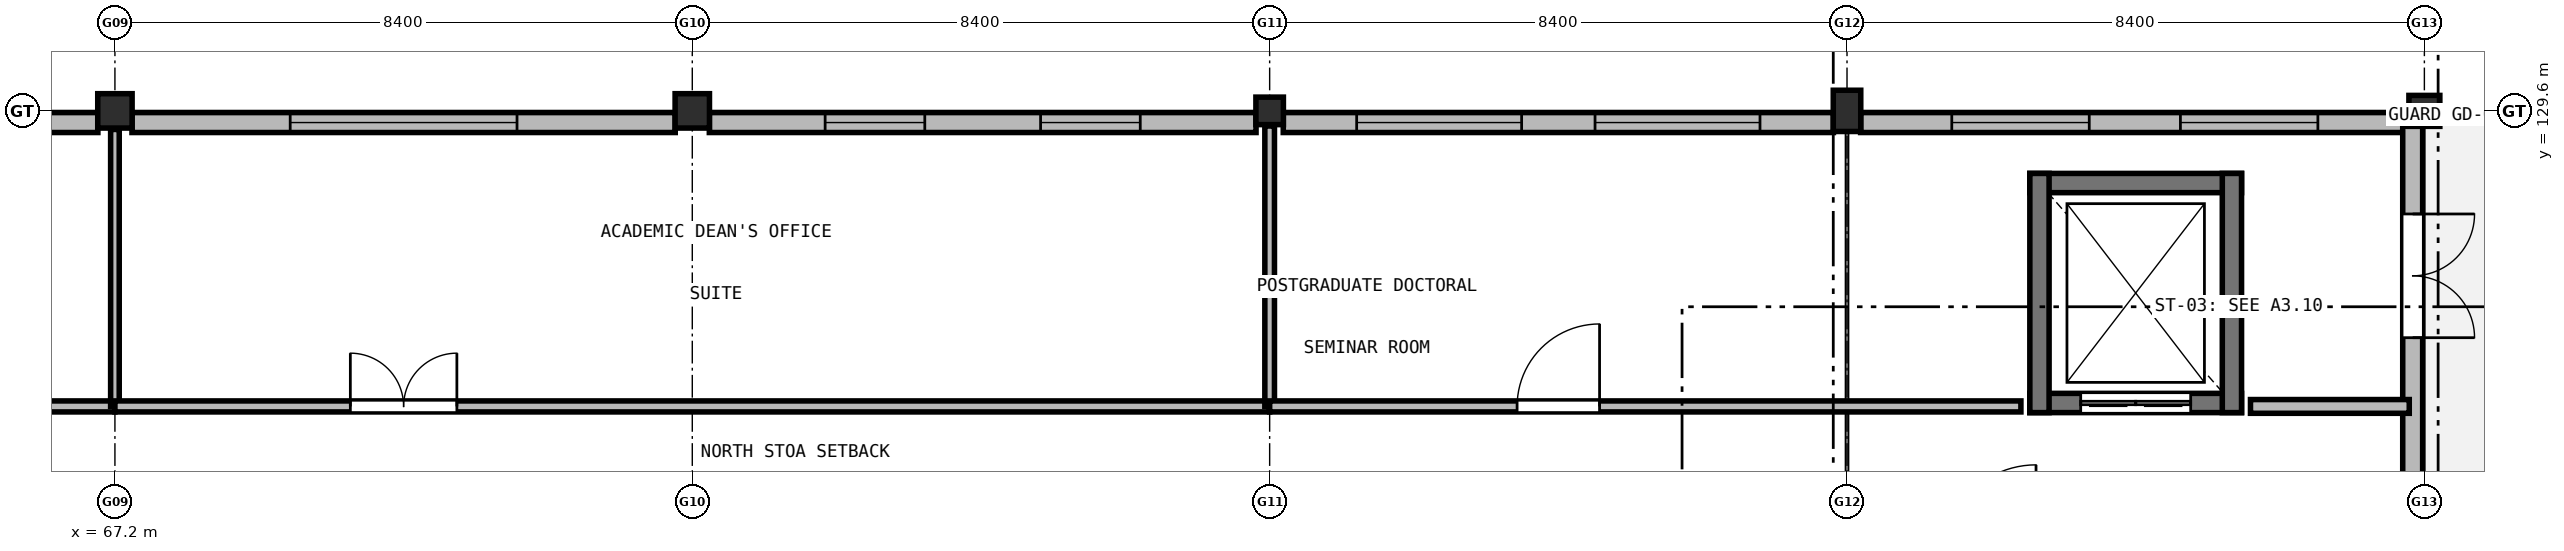
"""IFC4 building model, lengths in metres.
Left out: names, types, materials, properties, quantities, classifications, styles, units other than length and angle.
Written with IfcOpenShell. Run it as: python <this file> out.ifc"""

import sys

from ifc_helpers import new_model, si_unit, direction, frame, frame_2d, origin, origin_2d, place, context, subcontext, project, spatial, rectangle, extrude, element, fill, save


model = new_model("IFC4")
c1 = context("Model", 3, precision=1e-05, world=origin(), true_north=direction((0.0, 1.0)))
c2 = subcontext(c1, "Body", "Model", "MODEL_VIEW")
j1 = project(units=[si_unit("LENGTHUNIT", "METRE"), si_unit("PLANEANGLEUNIT", "RADIAN")], contexts=[c1])
p1 = place(None, origin())
s1 = spatial("IfcSite", under=j1, at=p1, CompositionType="ELEMENT")
p2 = place(p1, origin())
s2 = spatial("IfcBuilding", under=s1, at=p2, CompositionType="ELEMENT")
p3 = place(p2, frame((0.0, 0.0, 21.9)))
s3 = spatial("IfcBuildingStorey", under=s2, at=p3, CompositionType="ELEMENT", Elevation=21.9)
for number, where, z_axis, x_axis in (
    (1, (67.2, 129.6, 0.0), (0.0, 0.0, 1.0), (1.0, 0.0, 0.0)),
    (2, (75.6, 129.6, 0.0), (0.0, 0.0, 1.0), (1.0, 0.0, 0.0)),
):
    element("IfcColumn", number, at=place(p3, frame(where, z_axis=z_axis, x_axis=x_axis)), inside=s3, PredefinedType="COLUMN", context=c2, shape_type="SweptSolid", body=[
        extrude(rectangle(XDim=0.5, YDim=0.5, at=origin_2d()), origin(), (0.0, 0.0, 1.0), 4.2),
    ])
p4 = place(p3, frame((84.0, 129.6, 0.0), z_axis=(0.0, 0.0, 1.0), x_axis=(1.0, 0.0, 0.0)))
e3 = element("IfcColumn", 3, at=p4, inside=s3, PredefinedType="COLUMN", context=c2, shape_type="SweptSolid", body=[
    extrude(rectangle(XDim=0.4, YDim=0.4, at=origin_2d()), origin(), (0.0, 0.0, 1.0), 4.2),
])
p5 = place(p3, frame((92.4, 129.6, 0.0), z_axis=(0.0, 0.0, 1.0), x_axis=(1.0, 0.0, 0.0)))
e4 = element("IfcColumn", 4, at=p5, inside=s3, PredefinedType="COLUMN", context=c2, shape_type="SweptSolid", body=[
    extrude(rectangle(XDim=0.4, YDim=0.6, at=origin_2d()), origin(), (0.0, 0.0, 1.0), 4.2),
])
p6 = place(p3, frame((100.8, 129.6, 0.0), z_axis=(0.0, 0.0, 1.0), x_axis=(1.0, 0.0, 0.0)))
e5 = element("IfcColumn", 5, at=p6, inside=s3, PredefinedType="COLUMN", context=c2, shape_type="SweptSolid", body=[
    extrude(rectangle(XDim=0.45, YDim=0.45, at=origin_2d()), origin(), (0.0, 0.0, 1.0), 4.2),
])
p7 = place(p3, frame((59.048, 129.43, 0.0), z_axis=(0.0, 0.0, 1.0), x_axis=(1.0, 0.0, 0.0)))
e6 = element("IfcWall", 6, at=p7, inside=s3, PredefinedType="SOLIDWALL", context=c2, shape_type="SweptSolid", body=[
    extrude(rectangle(XDim=7.904, YDim=0.29, at=frame_2d((3.952, 0.0))), origin(), (0.0, 0.0, 1.0), 3.25),
])
p8 = place(p7, frame((2.402, 0.0, 0.95)))
e7 = element("IfcOpeningElement", 7, at=p8, cuts=e6, PredefinedType="OPENING", context=c2, shape_type="SweptSolid", body=[
    extrude(rectangle(XDim=3.1, YDim=1.95, at=frame_2d((1.55, 0.975))), frame((0.0, 0.155, 0.0), z_axis=(0.0, -1.0, 0.0), x_axis=(1.0, 0.0, 0.0)), (0.0, 0.0, 1.0), 0.31),
])
p9 = place(p3, frame((67.448, 129.43, 0.0), z_axis=(0.0, 0.0, 1.0), x_axis=(1.0, 0.0, 0.0)))
e8 = element("IfcWall", 8, at=p9, inside=s3, PredefinedType="SOLIDWALL", context=c2, shape_type="SweptSolid", body=[
    extrude(rectangle(XDim=7.904, YDim=0.29, at=frame_2d((3.952, 0.0))), origin(), (0.0, 0.0, 1.0), 3.25),
])
p10 = place(p9, frame((2.302, 0.0, 0.95)))
e9 = element("IfcOpeningElement", 9, at=p10, cuts=e8, PredefinedType="OPENING", context=c2, shape_type="SweptSolid", body=[
    extrude(rectangle(XDim=3.3, YDim=1.65, at=frame_2d((1.65, 0.825))), frame((0.0, 0.155, 0.0), z_axis=(0.0, -1.0, 0.0), x_axis=(1.0, 0.0, 0.0)), (0.0, 0.0, 1.0), 0.31),
])
p11 = place(p3, frame((75.848, 129.43, 0.0), z_axis=(0.0, 0.0, 1.0), x_axis=(1.0, 0.0, 0.0)))
e10 = element("IfcWall", 10, at=p11, inside=s3, PredefinedType="SOLIDWALL", context=c2, shape_type="SweptSolid", body=[
    extrude(rectangle(XDim=7.954, YDim=0.29, at=frame_2d((3.977, 0.0))), origin(), (0.0, 0.0, 1.0), 3.25),
])
p12 = place(p11, frame((1.685, 0.0, 0.95)))
e11 = element("IfcOpeningElement", 11, at=p12, cuts=e10, PredefinedType="OPENING", context=c2, shape_type="SweptSolid", body=[
    extrude(rectangle(XDim=1.45, YDim=1.85, at=frame_2d((0.725, 0.925))), frame((0.0, 0.155, 0.0), z_axis=(0.0, -1.0, 0.0), x_axis=(1.0, 0.0, 0.0)), (0.0, 0.0, 1.0), 0.31),
])
p13 = place(p11, frame((4.819, 0.0, 0.95)))
e12 = element("IfcOpeningElement", 12, at=p13, cuts=e10, PredefinedType="OPENING", context=c2, shape_type="SweptSolid", body=[
    extrude(rectangle(XDim=1.45, YDim=1.85, at=frame_2d((0.725, 0.925))), frame((0.0, 0.155, 0.0), z_axis=(0.0, -1.0, 0.0), x_axis=(1.0, 0.0, 0.0)), (0.0, 0.0, 1.0), 0.31),
])
p14 = place(p3, frame((84.198, 129.43, 0.0), z_axis=(0.0, 0.0, 1.0), x_axis=(1.0, 0.0, 0.0)))
e13 = element("IfcWall", 13, at=p14, inside=s3, PredefinedType="SOLIDWALL", context=c2, shape_type="SweptSolid", body=[
    extrude(rectangle(XDim=8.004, YDim=0.29, at=frame_2d((4.002, 0.0))), origin(), (0.0, 0.0, 1.0), 3.25),
])
p15 = place(p14, frame((1.068, 0.0, 0.95)))
e14 = element("IfcOpeningElement", 14, at=p15, cuts=e13, PredefinedType="OPENING", context=c2, shape_type="SweptSolid", body=[
    extrude(rectangle(XDim=2.4, YDim=2.05, at=frame_2d((1.2, 1.025))), frame((0.0, 0.155, 0.0), z_axis=(0.0, -1.0, 0.0), x_axis=(1.0, 0.0, 0.0)), (0.0, 0.0, 1.0), 0.31),
])
p16 = place(p14, frame((4.536, 0.0, 0.95)))
e15 = element("IfcOpeningElement", 15, at=p16, cuts=e13, PredefinedType="OPENING", context=c2, shape_type="SweptSolid", body=[
    extrude(rectangle(XDim=2.4, YDim=2.05, at=frame_2d((1.2, 1.025))), frame((0.0, 0.155, 0.0), z_axis=(0.0, -1.0, 0.0), x_axis=(1.0, 0.0, 0.0)), (0.0, 0.0, 1.0), 0.31),
])
p17 = place(p3, frame((92.598, 129.43, 0.0), z_axis=(0.0, 0.0, 1.0), x_axis=(1.0, 0.0, 0.0)))
e16 = element("IfcWall", 16, at=p17, inside=s3, PredefinedType="SOLIDWALL", context=c2, shape_type="SweptSolid", body=[
    extrude(rectangle(XDim=7.979, YDim=0.29, at=frame_2d((3.99, 0.0))), origin(), (0.0, 0.0, 1.0), 3.25),
])
p18 = place(p17, frame((1.326, 0.0, 0.95)))
e17 = element("IfcOpeningElement", 17, at=p18, cuts=e16, PredefinedType="OPENING", context=c2, shape_type="SweptSolid", body=[
    extrude(rectangle(XDim=2.0, YDim=2.0, at=frame_2d((1.0, 1.0))), frame((0.0, 0.155, 0.0), z_axis=(0.0, -1.0, 0.0), x_axis=(1.0, 0.0, 0.0)), (0.0, 0.0, 1.0), 0.31),
])
p19 = place(p17, frame((4.653, 0.0, 0.95)))
e18 = element("IfcOpeningElement", 18, at=p19, cuts=e16, PredefinedType="OPENING", context=c2, shape_type="SweptSolid", body=[
    extrude(rectangle(XDim=2.0, YDim=2.0, at=frame_2d((1.0, 1.0))), frame((0.0, 0.155, 0.0), z_axis=(0.0, -1.0, 0.0), x_axis=(1.0, 0.0, 0.0)), (0.0, 0.0, 1.0), 0.31),
])
p20 = place(p3, frame((100.63, 129.377, 0.0), z_axis=(0.0, 0.0, 1.0), x_axis=(0.0, -1.0, 0.0)))
e19 = element("IfcWall", 19, at=p20, inside=s3, PredefinedType="SOLIDWALL", context=c2, shape_type="SweptSolid", body=[
    extrude(rectangle(XDim=11.177, YDim=0.29, at=frame_2d((5.588, 0.0))), origin(), (0.0, 0.0, 1.0), 3.86),
])
p21 = place(p20, frame((1.277, 0.0, 0.0)))
e20 = element("IfcOpeningElement", 20, at=p21, cuts=e19, PredefinedType="OPENING", context=c2, shape_type="SweptSolid", body=[
    extrude(rectangle(XDim=1.8, YDim=2.2, at=frame_2d((0.9, 1.1))), frame((0.0, 0.155, 0.0), z_axis=(0.0, -1.0, 0.0), x_axis=(1.0, 0.0, 0.0)), (0.0, 0.0, 1.0), 0.31),
])
p22 = place(p3, frame((98.14, 125.35, 0.0), z_axis=(0.0, 0.0, 1.0), x_axis=(-1.0, 0.0, 0.0)))
e21 = element("IfcWall", 21, at=p22, inside=s3, PredefinedType="SHEAR", context=c2, shape_type="SweptSolid", body=[
    extrude(rectangle(XDim=3.08, YDim=0.28, at=frame_2d((1.54, 0.0))), origin(), (0.0, 0.0, 1.0), 3.88),
])
p23 = place(p22, frame((0.74, 0.0, 0.0)))
e22 = element("IfcOpeningElement", 22, at=p23, cuts=e21, PredefinedType="OPENING", context=c2, shape_type="SweptSolid", body=[
    extrude(rectangle(XDim=1.6, YDim=2.2, at=frame_2d((0.8, 1.1))), frame((0.0, 0.15, 0.0), z_axis=(0.0, -1.0, 0.0), x_axis=(1.0, 0.0, 0.0)), (0.0, 0.0, 1.0), 0.3),
])
p24 = place(p3, frame((95.06, 128.55, 0.0), z_axis=(0.0, 0.0, 1.0), x_axis=(1.0, 0.0, 0.0)))
e23 = element("IfcWall", 23, at=p24, inside=s3, PredefinedType="SHEAR", context=c2, shape_type="SweptSolid", body=[
    extrude(rectangle(XDim=3.08, YDim=0.28, at=frame_2d((1.54, 0.0))), origin(), (0.0, 0.0, 1.0), 3.88),
])
for number, where, z_axis, x_axis in (
    (24, (95.2, 125.21, 0.0), (0.0, 0.0, 1.0), (0.0, 1.0, 0.0)),
    (25, (98.0, 128.69, 0.0), (0.0, 0.0, 1.0), (0.0, -1.0, 0.0)),
):
    element("IfcWall", number, at=place(p3, frame(where, z_axis=z_axis, x_axis=x_axis)), inside=s3, PredefinedType="SHEAR", context=c2, shape_type="SweptSolid", body=[
        extrude(rectangle(XDim=3.48, YDim=0.28, at=frame_2d((1.74, 0.0))), origin(), (0.0, 0.0, 1.0), 3.88),
    ])
p25 = place(p3, frame((56.07, 125.3, 0.0), z_axis=(0.0, 0.0, 1.0), x_axis=(1.0, 0.0, 0.0)))
e26 = element("IfcWall", 26, at=p25, inside=s3, PredefinedType="PARTITIONING", context=c2, shape_type="SweptSolid", body=[
    extrude(rectangle(XDim=11.13, YDim=0.16, at=frame_2d((5.565, 0.0))), origin(), (0.0, 0.0, 1.0), 3.455),
])
p26 = place(p3, frame((67.2, 125.3, 0.0), z_axis=(0.0, 0.0, 1.0), x_axis=(0.0, 1.0, 0.0)))
e27 = element("IfcWall", 27, at=p26, inside=s3, PredefinedType="PARTITIONING", context=c2, shape_type="SweptSolid", body=[
    extrude(rectangle(XDim=4.03, YDim=0.125, at=frame_2d((2.015, 0.0))), origin(), (0.0, 0.0, 1.0), 3.245),
])
p27 = place(p3, frame((67.2, 125.3, 0.0), z_axis=(0.0, 0.0, 1.0), x_axis=(1.0, 0.0, 0.0)))
e28 = element("IfcWall", 28, at=p27, inside=s3, PredefinedType="PARTITIONING", context=c2, shape_type="SweptSolid", body=[
    extrude(rectangle(XDim=16.8, YDim=0.16, at=frame_2d((8.4, 0.0))), origin(), (0.0, 0.0, 1.0), 3.455),
])
p28 = place(p27, frame((3.425, 0.0, 0.0)))
e29 = element("IfcOpeningElement", 29, at=p28, cuts=e28, PredefinedType="OPENING", context=c2, shape_type="SweptSolid", body=[
    extrude(rectangle(XDim=1.55, YDim=2.2, at=frame_2d((0.775, 1.1))), frame((0.0, 0.09, 0.0), z_axis=(0.0, -1.0, 0.0), x_axis=(1.0, 0.0, 0.0)), (0.0, 0.0, 1.0), 0.18),
])
p29 = place(p3, frame((84.0, 125.3, 0.0), z_axis=(0.0, 0.0, 1.0), x_axis=(0.0, 1.0, 0.0)))
e30 = element("IfcWall", 30, at=p29, inside=s3, PredefinedType="PARTITIONING", context=c2, shape_type="SweptSolid", body=[
    extrude(rectangle(XDim=4.08, YDim=0.14, at=frame_2d((2.04, 0.0))), origin(), (0.0, 0.0, 1.0), 3.245),
])
p30 = place(p3, frame((84.0, 125.3, 0.0), z_axis=(0.0, 0.0, 1.0), x_axis=(1.0, 0.0, 0.0)))
e31 = element("IfcWall", 31, at=p30, inside=s3, PredefinedType="PARTITIONING", context=c2, shape_type="SweptSolid", body=[
    extrude(rectangle(XDim=10.93, YDim=0.16, at=frame_2d((5.465, 0.0))), origin(), (0.0, 0.0, 1.0), 3.455),
])
p31 = place(p30, frame((3.6, 0.0, 0.0)))
e32 = element("IfcOpeningElement", 32, at=p31, cuts=e31, PredefinedType="OPENING", context=c2, shape_type="SweptSolid", body=[
    extrude(rectangle(XDim=1.2, YDim=2.15, at=frame_2d((0.6, 1.075))), frame((0.0, 0.09, 0.0), z_axis=(0.0, -1.0, 0.0), x_axis=(1.0, 0.0, 0.0)), (0.0, 0.0, 1.0), 0.18),
])
p32 = place(p3, frame((98.27, 125.3, 0.0), z_axis=(0.0, 0.0, 1.0), x_axis=(1.0, 0.0, 0.0)))
e33 = element("IfcWall", 33, at=p32, inside=s3, PredefinedType="SOLIDWALL", context=c2, shape_type="SweptSolid", body=[
    extrude(rectangle(XDim=2.31, YDim=0.2, at=frame_2d((1.155, 0.0))), origin(), (0.0, 0.0, 1.0), 3.85),
])
p33 = place(p10, origin())
e34 = element("IfcWindow", 34, at=p33, inside=s3, PartitioningType="SINGLE_PANEL", PredefinedType="WINDOW", context=c2, shape_type="SweptSolid", body=[
    extrude(rectangle(XDim=3.3, YDim=1.65, at=frame_2d((1.65, 0.825))), frame((0.0, 0.03, 0.0), z_axis=(0.0, -1.0, 0.0), x_axis=(1.0, 0.0, 0.0)), (0.0, 0.0, 1.0), 0.06),
])
fill(e9, e34)
p34 = place(p12, origin())
e35 = element("IfcWindow", 35, at=p34, inside=s3, PartitioningType="SINGLE_PANEL", PredefinedType="WINDOW", context=c2, shape_type="SweptSolid", body=[
    extrude(rectangle(XDim=1.45, YDim=1.85, at=frame_2d((0.725, 0.925))), frame((0.0, 0.03, 0.0), z_axis=(0.0, -1.0, 0.0), x_axis=(1.0, 0.0, 0.0)), (0.0, 0.0, 1.0), 0.06),
])
fill(e11, e35)
p35 = place(p13, origin())
e36 = element("IfcWindow", 36, at=p35, inside=s3, PartitioningType="SINGLE_PANEL", PredefinedType="WINDOW", context=c2, shape_type="SweptSolid", body=[
    extrude(rectangle(XDim=1.45, YDim=1.85, at=frame_2d((0.725, 0.925))), frame((0.0, 0.03, 0.0), z_axis=(0.0, -1.0, 0.0), x_axis=(1.0, 0.0, 0.0)), (0.0, 0.0, 1.0), 0.06),
])
fill(e12, e36)
p36 = place(p15, origin())
e37 = element("IfcWindow", 37, at=p36, inside=s3, PartitioningType="SINGLE_PANEL", PredefinedType="WINDOW", context=c2, shape_type="SweptSolid", body=[
    extrude(rectangle(XDim=2.4, YDim=2.05, at=frame_2d((1.2, 1.025))), frame((0.0, 0.03, 0.0), z_axis=(0.0, -1.0, 0.0), x_axis=(1.0, 0.0, 0.0)), (0.0, 0.0, 1.0), 0.06),
])
fill(e14, e37)
p37 = place(p16, origin())
e38 = element("IfcWindow", 38, at=p37, inside=s3, PartitioningType="SINGLE_PANEL", PredefinedType="WINDOW", context=c2, shape_type="SweptSolid", body=[
    extrude(rectangle(XDim=2.4, YDim=2.05, at=frame_2d((1.2, 1.025))), frame((0.0, 0.03, 0.0), z_axis=(0.0, -1.0, 0.0), x_axis=(1.0, 0.0, 0.0)), (0.0, 0.0, 1.0), 0.06),
])
fill(e15, e38)
p38 = place(p18, origin())
e39 = element("IfcWindow", 39, at=p38, inside=s3, PartitioningType="SINGLE_PANEL", PredefinedType="WINDOW", context=c2, shape_type="SweptSolid", body=[
    extrude(rectangle(XDim=2.0, YDim=2.0, at=frame_2d((1.0, 1.0))), frame((0.0, 0.03, 0.0), z_axis=(0.0, -1.0, 0.0), x_axis=(1.0, 0.0, 0.0)), (0.0, 0.0, 1.0), 0.06),
])
fill(e17, e39)
p39 = place(p19, origin())
e40 = element("IfcWindow", 40, at=p39, inside=s3, PartitioningType="SINGLE_PANEL", PredefinedType="WINDOW", context=c2, shape_type="SweptSolid", body=[
    extrude(rectangle(XDim=2.0, YDim=2.0, at=frame_2d((1.0, 1.0))), frame((0.0, 0.03, 0.0), z_axis=(0.0, -1.0, 0.0), x_axis=(1.0, 0.0, 0.0)), (0.0, 0.0, 1.0), 0.06),
])
fill(e18, e40)
p40 = place(p21, origin())
e41 = element("IfcDoor", 41, at=p40, inside=s3, OperationType="DOUBLE_DOOR_SINGLE_SWING", PredefinedType="DOOR", context=c2, shape_type="SweptSolid", body=[
    extrude(rectangle(XDim=1.8, YDim=2.2, at=frame_2d((0.9, 1.1))), frame((0.0, 0.025, 0.0), z_axis=(0.0, -1.0, 0.0), x_axis=(1.0, 0.0, 0.0)), (0.0, 0.0, 1.0), 0.05),
])
fill(e20, e41)
p41 = place(p23, origin())
e42 = element("IfcDoor", 42, at=p41, inside=s3, OperationType="DOUBLE_DOOR_SLIDING", PredefinedType="DOOR", context=c2, shape_type="SweptSolid", body=[
    extrude(rectangle(XDim=1.6, YDim=2.2, at=frame_2d((0.8, 1.1))), frame((0.0, 0.025, 0.0), z_axis=(0.0, -1.0, 0.0), x_axis=(1.0, 0.0, 0.0)), (0.0, 0.0, 1.0), 0.05),
])
fill(e22, e42)
p42 = place(p28, origin())
e43 = element("IfcDoor", 43, at=p42, inside=s3, OperationType="DOUBLE_DOOR_SINGLE_SWING", PredefinedType="DOOR", context=c2, shape_type="SweptSolid", body=[
    extrude(rectangle(XDim=1.55, YDim=2.2, at=frame_2d((0.775, 1.1))), frame((0.0, 0.025, 0.0), z_axis=(0.0, -1.0, 0.0), x_axis=(1.0, 0.0, 0.0)), (0.0, 0.0, 1.0), 0.05),
])
fill(e29, e43)
p43 = place(p31, origin())
e44 = element("IfcDoor", 44, at=p43, inside=s3, OperationType="SINGLE_SWING_RIGHT", PredefinedType="DOOR", context=c2, shape_type="SweptSolid", body=[
    extrude(rectangle(XDim=1.2, YDim=2.15, at=frame_2d((0.6, 1.075))), frame((0.0, 0.025, 0.0), z_axis=(0.0, -1.0, 0.0), x_axis=(1.0, 0.0, 0.0)), (0.0, 0.0, 1.0), 0.05),
])
fill(e32, e44)
save(model, sys.argv[1])
